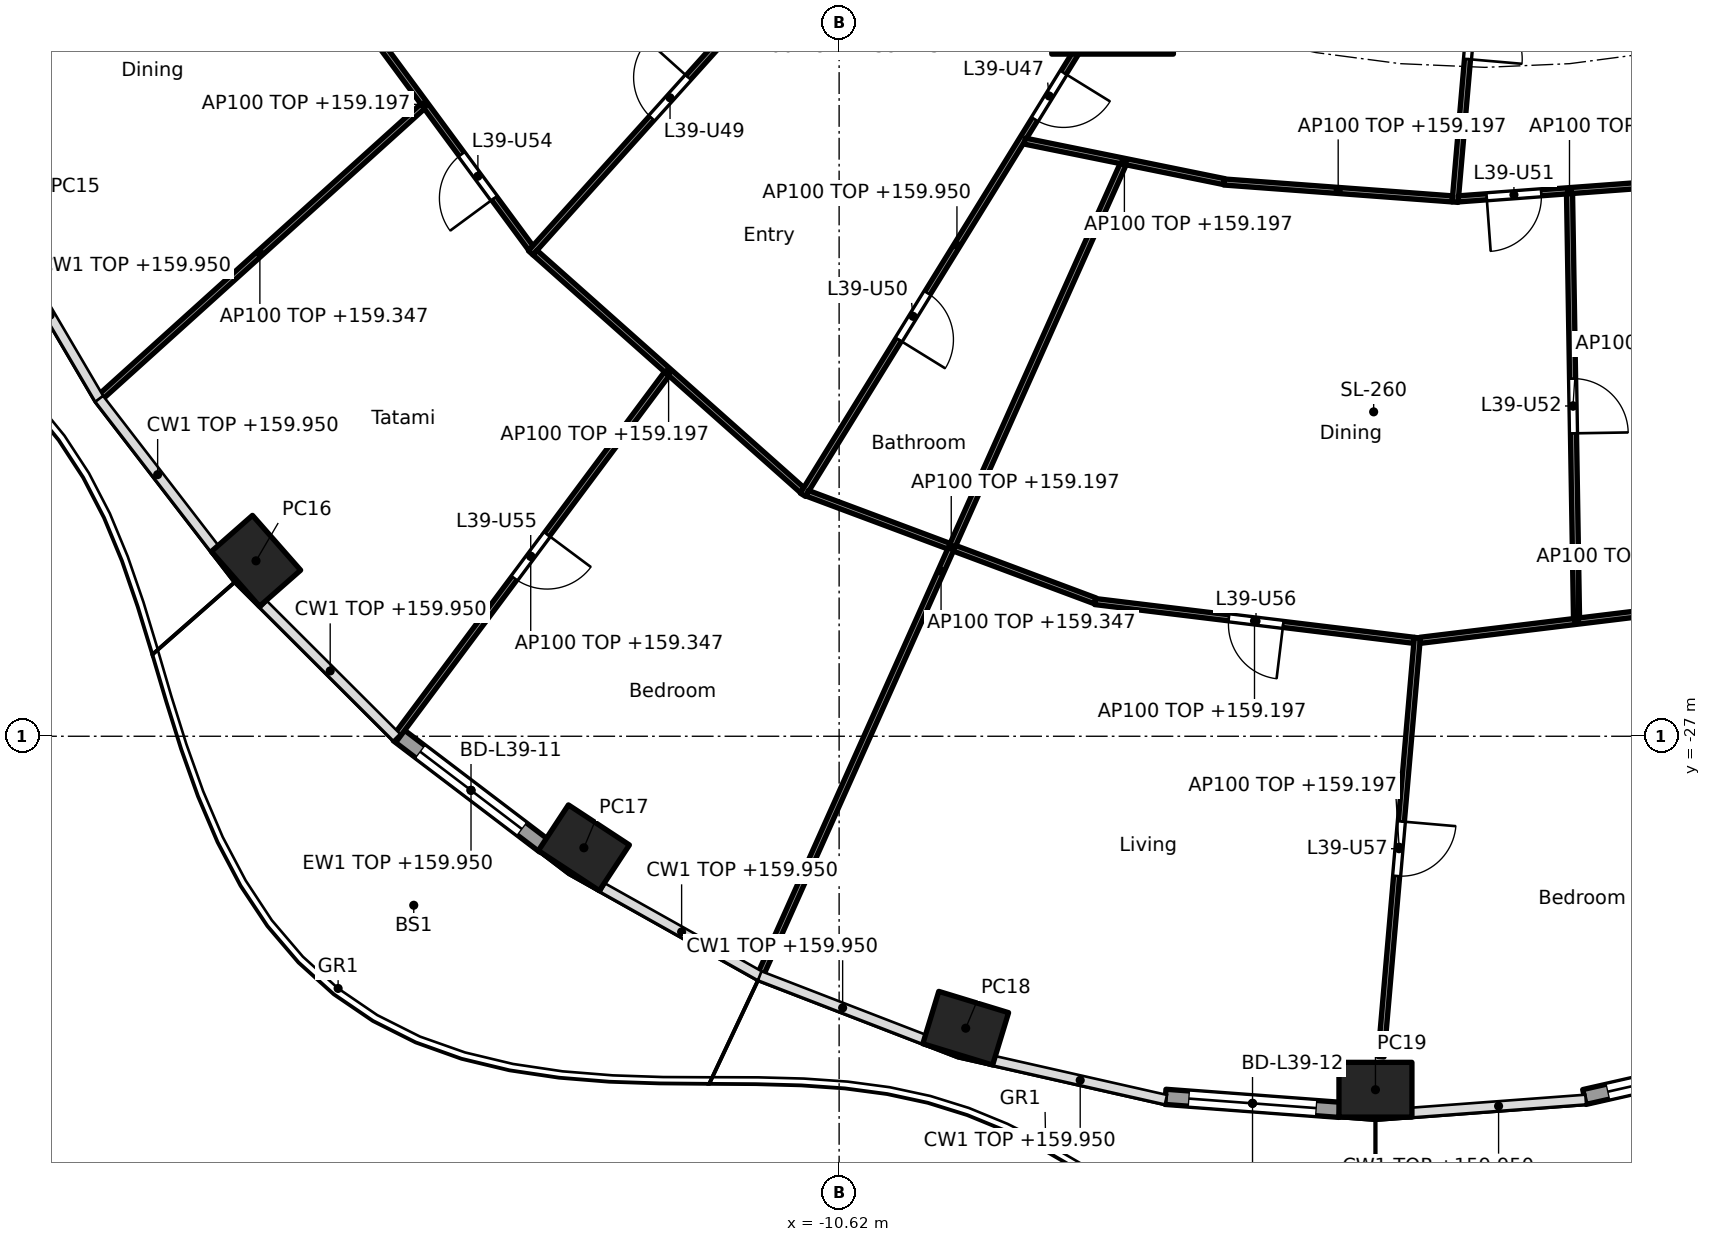
"""IFC4 building model, lengths in metres.
Left out: names, types, materials, properties, quantities, classifications, styles, units other than length and angle.
Written with IfcOpenShell. Run it as: python <this file> out.ifc"""

import sys

from ifc_helpers import new_model, si_unit, direction, frame, frame_2d, origin, origin_2d, place, context, subcontext, project, spatial, rectangle, hollow_rectangle, extrude, element, fill, save


model = new_model("IFC4")
c1 = context("Model", 3, precision=1e-05, world=origin(), true_north=direction((0.0, 1.0)))
c2 = subcontext(c1, "Body", "Model", "MODEL_VIEW")
j1 = project(units=[si_unit("LENGTHUNIT", "METRE"), si_unit("PLANEANGLEUNIT", "RADIAN")], contexts=[c1])
p1 = place(None, origin())
s1 = spatial("IfcSite", under=j1, at=p1, CompositionType="ELEMENT")
p2 = place(p1, origin())
s2 = spatial("IfcBuilding", under=s1, at=p2, CompositionType="ELEMENT")
p3 = place(p2, frame((0.0, 0.0, 156.6)))
s3 = spatial("IfcBuildingStorey", under=s2, at=p3, CompositionType="ELEMENT", Elevation=156.6)
for number, where, z_axis, x_axis in (
    (1, (-20.209, -24.115, 0.0), (0.0, 0.0, 1.0), (0.66, -0.751, 0.0)),
    (2, (-14.817, -28.834, 0.0), (0.0, 0.0, 1.0), (0.836, -0.549, 0.0)),
    (3, (-8.538, -31.801, 0.0), (0.0, 0.0, 1.0), (0.957, -0.292, 0.0)),
    (4, (-1.8, -32.813, 0.0), (0.0, 0.0, 1.0), (1.0, 0.0, 0.0)),
):
    element("IfcColumn", number, at=place(p3, frame(where, z_axis=z_axis, x_axis=x_axis)), inside=s3, PredefinedType="COLUMN", context=c2, shape_type="SweptSolid", body=[
        extrude(hollow_rectangle(XDim=1.2, YDim=0.9, WallThickness=0.04, at=origin_2d()), origin(), (0.0, 0.0, 1.0), 3.7),
    ])
p4 = place(p3, frame((-6.123, -14.782, 0.0), z_axis=(0.0, 0.0, 1.0), x_axis=(1.0, 0.0, 0.0)))
e5 = element("IfcColumn", 5, at=p4, inside=s3, PredefinedType="COLUMN", context=c2, shape_type="SweptSolid", body=[
    extrude(rectangle(XDim=2.0, YDim=2.0, at=origin_2d()), origin(), (0.0, 0.0, 1.0), 3.7),
])
p5 = place(p3, frame((-15.469, -28.805, 0.0), z_axis=(0.0, 0.0, 1.0), x_axis=(-0.796022231079, 0.605267385233, 0.0)))
e6 = element("IfcWall", 6, at=p5, inside=s3, PredefinedType="SOLIDWALL", context=c2, shape_type="SweptSolid", body=[
    extrude(rectangle(XDim=3.026, YDim=0.25, at=frame_2d((1.513, 0.0))), origin(), (0.0, 0.0, 1.0), 3.35),
])
p6 = place(p5, frame((0.463, 0.0, 0.0)))
e7 = element("IfcOpeningElement", 7, at=p6, cuts=e6, PredefinedType="OPENING", context=c2, shape_type="SweptSolid", body=[
    extrude(rectangle(XDim=2.1, YDim=2.4, at=frame_2d((1.05, 1.2))), frame((0.0, 0.135, 0.0), z_axis=(0.0, -1.0, 0.0), x_axis=(1.0, 0.0, 0.0)), (0.0, 0.0, 1.0), 0.27),
])
p7 = place(p3, frame((-2.389, -33.143, 0.0), z_axis=(0.0, 0.0, 1.0), x_axis=(-0.997231697044, 0.074356858535, 0.0)))
e8 = element("IfcWall", 8, at=p7, inside=s3, PredefinedType="SOLIDWALL", context=c2, shape_type="SweptSolid", body=[
    extrude(rectangle(XDim=2.873, YDim=0.25, at=frame_2d((1.437, 0.0))), origin(), (0.0, 0.0, 1.0), 3.35),
])
p8 = place(p7, frame((0.386, 0.0, 0.0)))
e9 = element("IfcOpeningElement", 9, at=p8, cuts=e8, PredefinedType="OPENING", context=c2, shape_type="SweptSolid", body=[
    extrude(rectangle(XDim=2.1, YDim=2.4, at=frame_2d((1.05, 1.2))), frame((0.0, 0.135, 0.0), z_axis=(0.0, -1.0, 0.0), x_axis=(1.0, 0.0, 0.0)), (0.0, 0.0, 1.0), 0.27),
])
p9 = place(p3, frame((4.455, -32.294, 0.0), z_axis=(0.0, 0.0, 1.0), x_axis=(-0.975339035722, -0.220711951186, 0.0)))
e10 = element("IfcWall", 10, at=p9, inside=s3, PredefinedType="SOLIDWALL", context=c2, shape_type="SweptSolid", body=[
    extrude(rectangle(XDim=2.89, YDim=0.25, at=frame_2d((1.445, 0.0))), origin(), (0.0, 0.0, 1.0), 3.35),
])
p10 = place(p9, frame((0.395, 0.0, 0.0)))
e11 = element("IfcOpeningElement", 11, at=p10, cuts=e10, PredefinedType="OPENING", context=c2, shape_type="SweptSolid", body=[
    extrude(rectangle(XDim=2.1, YDim=2.4, at=frame_2d((1.05, 1.2))), frame((0.0, 0.135, 0.0), z_axis=(0.0, -1.0, 0.0), x_axis=(1.0, 0.0, 0.0)), (0.0, 0.0, 1.0), 0.27),
])
p11 = place(p3, frame((-19.176, -14.244, 0.0), z_axis=(0.0, 0.0, 1.0), x_axis=(0.593532053206, -0.80481035146, 0.0)))
e12 = element("IfcWall", 12, at=p11, inside=s3, PredefinedType="PARTITIONING", context=c2, shape_type="SweptSolid", body=[
    extrude(rectangle(XDim=5.876, YDim=0.1, at=frame_2d((2.938, 0.0))), origin(), (0.0, 0.0, 1.0), 2.597),
])
p12 = place(p11, frame((3.957, 0.0, 0.0)))
e13 = element("IfcOpeningElement", 13, at=p12, cuts=e12, PredefinedType="OPENING", context=c2, shape_type="SweptSolid", body=[
    extrude(rectangle(XDim=0.9, YDim=2.1, at=frame_2d((0.45, 1.05))), frame((0.0, 0.06, 0.0), z_axis=(0.0, -1.0, 0.0), x_axis=(1.0, 0.0, 0.0)), (0.0, 0.0, 1.0), 0.12),
])
p13 = place(p3, frame((-17.47, -16.642, 0.0), z_axis=(0.0, 0.0, 1.0), x_axis=(-0.742345465337, -0.670017320742, 0.0)))
e14 = element("IfcWall", 14, at=p13, inside=s3, PredefinedType="PARTITIONING", context=c2, shape_type="SweptSolid", body=[
    extrude(rectangle(XDim=7.21, YDim=0.1, at=frame_2d((3.605, 0.0))), origin(), (0.0, 0.0, 1.0), 2.747),
])
p14 = place(p3, frame((-7.725, -10.186, 0.0), z_axis=(0.0, 0.0, 1.0), x_axis=(-0.668498346565, -0.743713628112, 0.0)))
e15 = element("IfcWall", 15, at=p14, inside=s3, PredefinedType="PARTITIONING", context=c2, shape_type="SweptSolid", body=[
    extrude(rectangle(XDim=11.919, YDim=0.1, at=frame_2d((5.959, 0.0))), origin(), (0.0, 0.0, 1.0), 2.515),
])
p15 = place(p14, frame((2.106, 0.0, 0.0)))
e16 = element("IfcOpeningElement", 16, at=p15, cuts=e15, PredefinedType="OPENING", context=c2, shape_type="SweptSolid", body=[
    extrude(rectangle(XDim=0.9, YDim=2.1, at=frame_2d((0.45, 1.05))), frame((0.0, 0.06, 0.0), z_axis=(0.0, -1.0, 0.0), x_axis=(1.0, 0.0, 0.0)), (0.0, 0.0, 1.0), 0.12),
])
p16 = place(p14, frame((8.041, 0.0, 0.0)))
e17 = element("IfcOpeningElement", 17, at=p16, cuts=e15, PredefinedType="OPENING", context=c2, shape_type="SweptSolid", body=[
    extrude(rectangle(XDim=0.9, YDim=2.1, at=frame_2d((0.45, 1.05))), frame((0.0, 0.06, 0.0), z_axis=(0.0, -1.0, 0.0), x_axis=(1.0, 0.0, 0.0)), (0.0, 0.0, 1.0), 0.12),
])
p17 = place(p3, frame((-15.622, -19.046, 0.0), z_axis=(0.0, 0.0, 1.0), x_axis=(0.747342891849, -0.664438561496, 0.0)))
e18 = element("IfcWall", 18, at=p17, inside=s3, PredefinedType="PARTITIONING", context=c2, shape_type="SweptSolid", body=[
    extrude(rectangle(XDim=5.881, YDim=0.1, at=frame_2d((2.94, 0.0))), origin(), (0.0, 0.0, 1.0), 2.597),
])
p18 = place(p3, frame((-13.454, -21.04, 0.0), z_axis=(0.0, 0.0, 1.0), x_axis=(-0.597848033124, -0.801609461826, 0.0)))
e19 = element("IfcWall", 19, at=p18, inside=s3, PredefinedType="PARTITIONING", context=c2, shape_type="SweptSolid", body=[
    extrude(rectangle(XDim=7.486, YDim=0.1, at=frame_2d((3.743, 0.0))), origin(), (0.0, 0.0, 1.0), 2.747),
])
p19 = place(p18, frame((3.293, 0.0, 0.0)))
e20 = element("IfcOpeningElement", 20, at=p19, cuts=e19, PredefinedType="OPENING", context=c2, shape_type="SweptSolid", body=[
    extrude(rectangle(XDim=0.9, YDim=2.1, at=frame_2d((0.45, 1.05))), frame((0.0, 0.06, 0.0), z_axis=(0.0, -1.0, 0.0), x_axis=(1.0, 0.0, 0.0)), (0.0, 0.0, 1.0), 0.12),
])
p20 = place(p3, frame((-6.149, -14.825, 0.0), z_axis=(0.0, 0.0, 1.0), x_axis=(-0.525396393596, -0.850857584791, 0.0)))
e21 = element("IfcWall", 21, at=p20, inside=s3, PredefinedType="PARTITIONING", context=c2, shape_type="SweptSolid", body=[
    extrude(rectangle(XDim=9.643, YDim=0.1, at=frame_2d((4.822, 0.0))), origin(), (0.0, 0.0, 1.0), 3.35),
])
p21 = place(p20, frame((1.485, 0.0, 0.0)))
e22 = element("IfcOpeningElement", 22, at=p21, cuts=e21, PredefinedType="OPENING", context=c2, shape_type="SweptSolid", body=[
    extrude(rectangle(XDim=0.9, YDim=2.1, at=frame_2d((0.45, 1.05))), frame((0.0, 0.06, 0.0), z_axis=(0.0, -1.0, 0.0), x_axis=(1.0, 0.0, 0.0)), (0.0, 0.0, 1.0), 0.12),
])
p22 = place(p20, frame((5.744, 0.0, 0.0)))
e23 = element("IfcOpeningElement", 23, at=p22, cuts=e21, PredefinedType="OPENING", context=c2, shape_type="SweptSolid", body=[
    extrude(rectangle(XDim=0.9, YDim=2.1, at=frame_2d((0.45, 1.05))), frame((0.0, 0.06, 0.0), z_axis=(0.0, -1.0, 0.0), x_axis=(1.0, 0.0, 0.0)), (0.0, 0.0, 1.0), 0.12),
])
p23 = place(p3, frame((-7.568, -17.212, 0.0), z_axis=(0.0, 0.0, 1.0), x_axis=(0.979967079473, -0.199159541946, 0.0)))
e24 = element("IfcWall", 24, at=p23, inside=s3, PredefinedType="PARTITIONING", context=c2, shape_type="SweptSolid", body=[
    extrude(rectangle(XDim=3.347, YDim=0.1, at=frame_2d((1.673, 0.0))), origin(), (0.0, 0.0, 1.0), 2.597),
])
p24 = place(p3, frame((-11.143, -23.004, 0.0), z_axis=(0.0, 0.0, 1.0), x_axis=(0.936721765635, -0.350074754567, 0.0)))
e25 = element("IfcWall", 25, at=p24, inside=s3, PredefinedType="PARTITIONING", context=c2, shape_type="SweptSolid", body=[
    extrude(rectangle(XDim=5.053, YDim=0.1, at=frame_2d((2.526, 0.0))), origin(), (0.0, 0.0, 1.0), 2.597),
])
p25 = place(p3, frame((-5.949, -17.591, 0.0), z_axis=(0.0, 0.0, 1.0), x_axis=(-0.40838467696, -0.912809923053, 0.0)))
e26 = element("IfcWall", 26, at=p25, inside=s3, PredefinedType="PARTITIONING", context=c2, shape_type="SweptSolid", body=[
    extrude(rectangle(XDim=14.665, YDim=0.1, at=frame_2d((7.333, 0.0))), origin(), (0.0, 0.0, 1.0), 2.747),
])
p26 = place(p3, frame((-4.29, -17.885, 0.0), z_axis=(0.0, 0.0, 1.0), x_axis=(0.997272353708, -0.073809569363, 0.0)))
e27 = element("IfcWall", 27, at=p26, inside=s3, PredefinedType="PARTITIONING", context=c2, shape_type="SweptSolid", body=[
    extrude(rectangle(XDim=3.764, YDim=0.1, at=frame_2d((1.882, 0.0))), origin(), (0.0, 0.0, 1.0), 2.597),
])
p27 = place(p3, frame((-6.413, -24.784, 0.0), z_axis=(0.0, 0.0, 1.0), x_axis=(0.992690077723, -0.120691381588, 0.0)))
e28 = element("IfcWall", 28, at=p27, inside=s3, PredefinedType="PARTITIONING", context=c2, shape_type="SweptSolid", body=[
    extrude(rectangle(XDim=5.286, YDim=0.1, at=frame_2d((2.643, 0.0))), origin(), (0.0, 0.0, 1.0), 2.597),
])
p28 = place(p27, frame((2.218, 0.0, 0.0)))
e29 = element("IfcOpeningElement", 29, at=p28, cuts=e28, PredefinedType="OPENING", context=c2, shape_type="SweptSolid", body=[
    extrude(rectangle(XDim=0.9, YDim=2.1, at=frame_2d((0.45, 1.05))), frame((0.0, 0.06, 0.0), z_axis=(0.0, -1.0, 0.0), x_axis=(1.0, 0.0, 0.0)), (0.0, 0.0, 1.0), 0.12),
])
p29 = place(p3, frame((-0.009, -12.664, 0.0), z_axis=(0.0, 0.0, 1.0), x_axis=(-0.086431127211, -0.9962578282, 0.0)))
e30 = element("IfcWall", 30, at=p29, inside=s3, PredefinedType="PARTITIONING", context=c2, shape_type="SweptSolid", body=[
    extrude(rectangle(XDim=5.573, YDim=0.1, at=frame_2d((2.787, 0.0))), origin(), (0.0, 0.0, 1.0), 2.515),
])
p30 = place(p29, frame((2.312, 0.0, 0.0)))
e31 = element("IfcOpeningElement", 31, at=p30, cuts=e30, PredefinedType="OPENING", context=c2, shape_type="SweptSolid", body=[
    extrude(rectangle(XDim=0.9, YDim=2.1, at=frame_2d((0.45, 1.05))), frame((0.0, 0.06, 0.0), z_axis=(0.0, -1.0, 0.0), x_axis=(1.0, 0.0, 0.0)), (0.0, 0.0, 1.0), 0.12),
])
p31 = place(p3, frame((-0.436, -18.163, 0.0), z_axis=(0.0, 0.0, 1.0), x_axis=(0.997271025958, 0.073827506966, 0.0)))
e32 = element("IfcWall", 32, at=p31, inside=s3, PredefinedType="PARTITIONING", context=c2, shape_type="SweptSolid", body=[
    extrude(rectangle(XDim=3.664, YDim=0.1, at=frame_2d((1.832, 0.0))), origin(), (0.0, 0.0, 1.0), 2.597),
])
p32 = place(p31, frame((0.466, 0.0, 0.0)))
e33 = element("IfcOpeningElement", 33, at=p32, cuts=e32, PredefinedType="OPENING", context=c2, shape_type="SweptSolid", body=[
    extrude(rectangle(XDim=0.9, YDim=2.1, at=frame_2d((0.45, 1.05))), frame((0.0, 0.06, 0.0), z_axis=(0.0, -1.0, 0.0), x_axis=(1.0, 0.0, 0.0)), (0.0, 0.0, 1.0), 0.12),
])
p33 = place(p3, frame((-1.112, -25.379, 0.0), z_axis=(0.0, 0.0, 1.0), x_axis=(-0.08643315117, -0.996257652607, 0.0)))
e34 = element("IfcWall", 34, at=p33, inside=s3, PredefinedType="PARTITIONING", context=c2, shape_type="SweptSolid", body=[
    extrude(rectangle(XDim=6.917, YDim=0.1, at=frame_2d((3.459, 0.0))), origin(), (0.0, 0.0, 1.0), 2.597),
])
p34 = place(p33, frame((3.034, 0.0, 0.0)))
e35 = element("IfcOpeningElement", 35, at=p34, cuts=e34, PredefinedType="OPENING", context=c2, shape_type="SweptSolid", body=[
    extrude(rectangle(XDim=0.9, YDim=2.1, at=frame_2d((0.45, 1.05))), frame((0.0, 0.06, 0.0), z_axis=(0.0, -1.0, 0.0), x_axis=(1.0, 0.0, 0.0)), (0.0, 0.0, 1.0), 0.12),
])
p35 = place(p3, frame((-1.066, -25.422, 0.0), z_axis=(0.0, 0.0, 1.0), x_axis=(0.992692993044, 0.120667400577, 0.0)))
e36 = element("IfcWall", 36, at=p35, inside=s3, PredefinedType="PARTITIONING", context=c2, shape_type="SweptSolid", body=[
    extrude(rectangle(XDim=5.186, YDim=0.1, at=frame_2d((2.593, 0.0))), origin(), (0.0, 0.0, 1.0), 2.597),
])
p36 = place(p3, frame((1.392, -18.078, 0.0), z_axis=(0.0, 0.0, 1.0), x_axis=(0.016433071124, -0.99986496797, 0.0)))
e37 = element("IfcWall", 37, at=p36, inside=s3, PredefinedType="PARTITIONING", context=c2, shape_type="SweptSolid", body=[
    extrude(rectangle(XDim=6.983, YDim=0.1, at=frame_2d((3.491, 0.0))), origin(), (0.0, 0.0, 1.0), 3.35),
])
p37 = place(p36, frame((3.041, 0.0, 0.0)))
e38 = element("IfcOpeningElement", 38, at=p37, cuts=e37, PredefinedType="OPENING", context=c2, shape_type="SweptSolid", body=[
    extrude(rectangle(XDim=0.9, YDim=2.1, at=frame_2d((0.45, 1.05))), frame((0.0, 0.06, 0.0), z_axis=(0.0, -1.0, 0.0), x_axis=(1.0, 0.0, 0.0)), (0.0, 0.0, 1.0), 0.12),
])
p38 = place(p6, origin())
e39 = element("IfcDoor", 39, at=p38, inside=s3, OperationType="SLIDING_TO_LEFT", PredefinedType="DOOR", context=c2, shape_type="SweptSolid", body=[
    extrude(rectangle(XDim=2.1, YDim=2.4, at=frame_2d((1.05, 1.2))), frame((0.0, 0.025, 0.0), z_axis=(0.0, -1.0, 0.0), x_axis=(1.0, 0.0, 0.0)), (0.0, 0.0, 1.0), 0.05),
])
fill(e7, e39)
p39 = place(p8, origin())
e40 = element("IfcDoor", 40, at=p39, inside=s3, OperationType="SLIDING_TO_LEFT", PredefinedType="DOOR", context=c2, shape_type="SweptSolid", body=[
    extrude(rectangle(XDim=2.1, YDim=2.4, at=frame_2d((1.05, 1.2))), frame((0.0, 0.025, 0.0), z_axis=(0.0, -1.0, 0.0), x_axis=(1.0, 0.0, 0.0)), (0.0, 0.0, 1.0), 0.05),
])
fill(e9, e40)
p40 = place(p10, origin())
e41 = element("IfcDoor", 41, at=p40, inside=s3, OperationType="SLIDING_TO_LEFT", PredefinedType="DOOR", context=c2, shape_type="SweptSolid", body=[
    extrude(rectangle(XDim=2.1, YDim=2.4, at=frame_2d((1.05, 1.2))), frame((0.0, 0.025, 0.0), z_axis=(0.0, -1.0, 0.0), x_axis=(1.0, 0.0, 0.0)), (0.0, 0.0, 1.0), 0.05),
])
fill(e11, e41)
p41 = place(p21, origin())
e42 = element("IfcDoor", 42, at=p41, inside=s3, OperationType="SINGLE_SWING_LEFT", PredefinedType="DOOR", context=c2, shape_type="SweptSolid", body=[
    extrude(rectangle(XDim=0.9, YDim=2.1, at=frame_2d((0.45, 1.05))), frame((0.0, 0.025, 0.0), z_axis=(0.0, -1.0, 0.0), x_axis=(1.0, 0.0, 0.0)), (0.0, 0.0, 1.0), 0.05),
])
fill(e22, e42)
p42 = place(p30, origin())
e43 = element("IfcDoor", 43, at=p42, inside=s3, OperationType="SINGLE_SWING_RIGHT", PredefinedType="DOOR", context=c2, shape_type="SweptSolid", body=[
    extrude(rectangle(XDim=0.9, YDim=2.1, at=frame_2d((0.45, 1.05))), frame((0.0, 0.025, 0.0), z_axis=(0.0, -1.0, 0.0), x_axis=(1.0, 0.0, 0.0)), (0.0, 0.0, 1.0), 0.05),
])
fill(e31, e43)
p43 = place(p16, frame((0.9, 0.0, 0.0), x_axis=(-1.0, 0.0, 0.0)))
e44 = element("IfcDoor", 44, at=p43, inside=s3, OperationType="SINGLE_SWING_RIGHT", PredefinedType="DOOR", context=c2, shape_type="SweptSolid", body=[
    extrude(rectangle(XDim=0.9, YDim=2.1, at=frame_2d((0.45, 1.05))), frame((0.0, 0.025, 0.0), z_axis=(0.0, -1.0, 0.0), x_axis=(1.0, 0.0, 0.0)), (0.0, 0.0, 1.0), 0.05),
])
fill(e17, e44)
p44 = place(p22, origin())
e45 = element("IfcDoor", 45, at=p44, inside=s3, OperationType="SINGLE_SWING_RIGHT", PredefinedType="DOOR", context=c2, shape_type="SweptSolid", body=[
    extrude(rectangle(XDim=0.9, YDim=2.1, at=frame_2d((0.45, 1.05))), frame((0.0, 0.025, 0.0), z_axis=(0.0, -1.0, 0.0), x_axis=(1.0, 0.0, 0.0)), (0.0, 0.0, 1.0), 0.05),
])
fill(e23, e45)
p45 = place(p32, frame((0.9, 0.0, 0.0), x_axis=(-1.0, 0.0, 0.0)))
e46 = element("IfcDoor", 46, at=p45, inside=s3, OperationType="SINGLE_SWING_RIGHT", PredefinedType="DOOR", context=c2, shape_type="SweptSolid", body=[
    extrude(rectangle(XDim=0.9, YDim=2.1, at=frame_2d((0.45, 1.05))), frame((0.0, 0.025, 0.0), z_axis=(0.0, -1.0, 0.0), x_axis=(1.0, 0.0, 0.0)), (0.0, 0.0, 1.0), 0.05),
])
fill(e33, e46)
p46 = place(p37, origin())
e47 = element("IfcDoor", 47, at=p46, inside=s3, OperationType="SINGLE_SWING_RIGHT", PredefinedType="DOOR", context=c2, shape_type="SweptSolid", body=[
    extrude(rectangle(XDim=0.9, YDim=2.1, at=frame_2d((0.45, 1.05))), frame((0.0, 0.025, 0.0), z_axis=(0.0, -1.0, 0.0), x_axis=(1.0, 0.0, 0.0)), (0.0, 0.0, 1.0), 0.05),
])
fill(e38, e47)
p47 = place(p12, frame((0.9, 0.0, 0.0), x_axis=(-1.0, 0.0, 0.0)))
e48 = element("IfcDoor", 48, at=p47, inside=s3, OperationType="SINGLE_SWING_LEFT", PredefinedType="DOOR", context=c2, shape_type="SweptSolid", body=[
    extrude(rectangle(XDim=0.9, YDim=2.1, at=frame_2d((0.45, 1.05))), frame((0.0, 0.025, 0.0), z_axis=(0.0, -1.0, 0.0), x_axis=(1.0, 0.0, 0.0)), (0.0, 0.0, 1.0), 0.05),
])
fill(e13, e48)
p48 = place(p19, origin())
e49 = element("IfcDoor", 49, at=p48, inside=s3, OperationType="SINGLE_SWING_LEFT", PredefinedType="DOOR", context=c2, shape_type="SweptSolid", body=[
    extrude(rectangle(XDim=0.9, YDim=2.1, at=frame_2d((0.45, 1.05))), frame((0.0, 0.025, 0.0), z_axis=(0.0, -1.0, 0.0), x_axis=(1.0, 0.0, 0.0)), (0.0, 0.0, 1.0), 0.05),
])
fill(e20, e49)
p49 = place(p28, frame((0.9, 0.0, 0.0), x_axis=(-1.0, 0.0, 0.0)))
e50 = element("IfcDoor", 50, at=p49, inside=s3, OperationType="SINGLE_SWING_LEFT", PredefinedType="DOOR", context=c2, shape_type="SweptSolid", body=[
    extrude(rectangle(XDim=0.9, YDim=2.1, at=frame_2d((0.45, 1.05))), frame((0.0, 0.025, 0.0), z_axis=(0.0, -1.0, 0.0), x_axis=(1.0, 0.0, 0.0)), (0.0, 0.0, 1.0), 0.05),
])
fill(e29, e50)
p50 = place(p34, origin())
e51 = element("IfcDoor", 51, at=p50, inside=s3, OperationType="SINGLE_SWING_LEFT", PredefinedType="DOOR", context=c2, shape_type="SweptSolid", body=[
    extrude(rectangle(XDim=0.9, YDim=2.1, at=frame_2d((0.45, 1.05))), frame((0.0, 0.025, 0.0), z_axis=(0.0, -1.0, 0.0), x_axis=(1.0, 0.0, 0.0)), (0.0, 0.0, 1.0), 0.05),
])
fill(e35, e51)
save(model, sys.argv[1])
